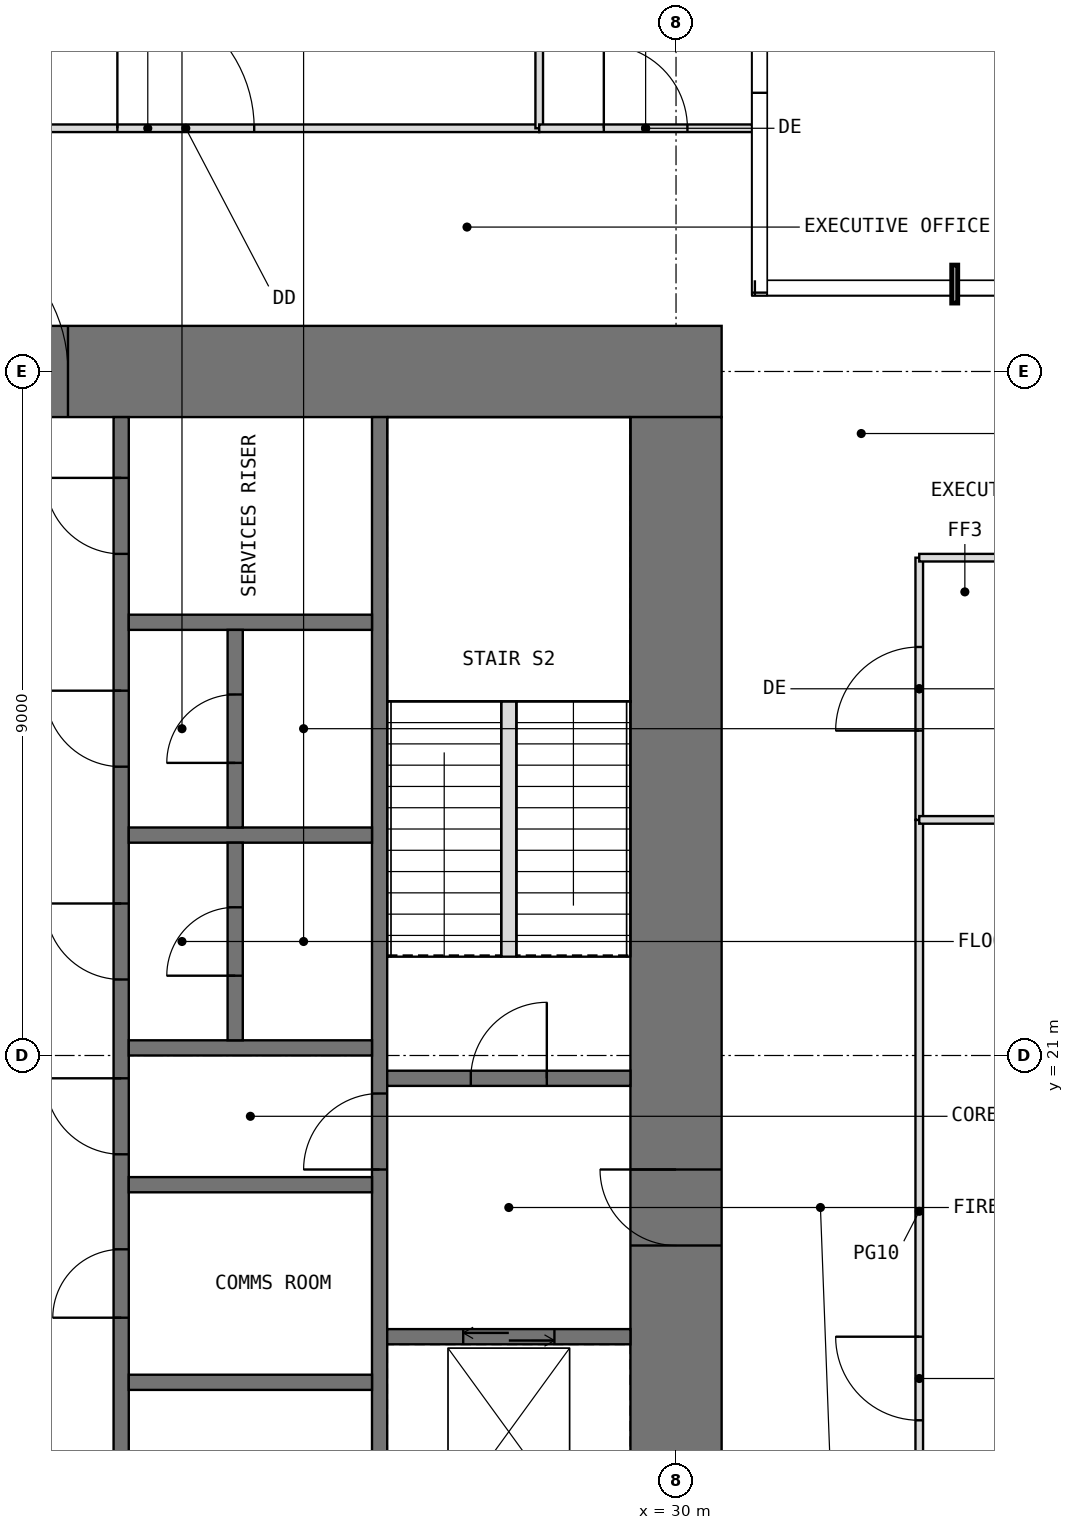
"""IFC4 building model, lengths in metres.
Left out: names, types, materials, properties, quantities, classifications, styles, units other than length and angle.
Written with IfcOpenShell. Run it as: python <this file> out.ifc"""

import sys

from ifc_helpers import new_model, si_unit, direction, frame, frame_2d, origin, place, context, subcontext, project, spatial, rectangle, extrude, element, fill, save


model = new_model("IFC4")
c1 = context("Model", 3, precision=1e-05, world=origin(), true_north=direction((0.0, 1.0)))
c2 = subcontext(c1, "Body", "Model", "MODEL_VIEW")
j1 = project(units=[si_unit("LENGTHUNIT", "METRE"), si_unit("PLANEANGLEUNIT", "RADIAN")], contexts=[c1])
p1 = place(None, origin())
s1 = spatial("IfcSite", under=j1, at=p1, CompositionType="ELEMENT")
p2 = place(p1, origin())
s2 = spatial("IfcBuilding", under=s1, at=p2, CompositionType="ELEMENT")
p3 = place(p2, frame((0.0, 0.0, 252.4)))
s3 = spatial("IfcBuildingStorey", under=s2, at=p3, CompositionType="ELEMENT", Elevation=252.4)
p4 = place(p3, frame((11.4, 30.0, -0.05), z_axis=(0.0, 0.0, 1.0), x_axis=(1.0, 0.0, 0.0)))
e1 = element("IfcWall", 1, at=p4, inside=s3, PredefinedType="SHEAR", context=c2, shape_type="SweptSolid", body=[
    extrude(rectangle(XDim=19.2, YDim=1.2, at=frame_2d((9.6, 0.0))), origin(), (0.0, 0.0, 1.0), 4.2),
])
p5 = place(p4, frame((8.6, 0.0, 0.05)))
e2 = element("IfcOpeningElement", 2, at=p5, cuts=e1, PredefinedType="OPENING", context=c2, shape_type="SweptSolid", body=[
    extrude(rectangle(XDim=2.0, YDim=2.2, at=frame_2d((1.0, 1.1))), frame((0.0, 0.61, 0.0), z_axis=(0.0, -1.0, 0.0), x_axis=(1.0, 0.0, 0.0)), (0.0, 0.0, 1.0), 1.22),
])
p6 = place(p3, frame((30.0, 12.6, -0.05), z_axis=(0.0, 0.0, 1.0), x_axis=(0.0, 1.0, 0.0)))
e3 = element("IfcWall", 3, at=p6, inside=s3, PredefinedType="SHEAR", context=c2, shape_type="SweptSolid", body=[
    extrude(rectangle(XDim=16.8, YDim=1.2, at=frame_2d((8.4, 0.0))), origin(), (0.0, 0.0, 1.0), 4.2),
])
p7 = place(p6, frame((5.9, 0.0, 0.05)))
e4 = element("IfcOpeningElement", 4, at=p7, cuts=e3, PredefinedType="OPENING", context=c2, shape_type="SweptSolid", body=[
    extrude(rectangle(XDim=1.0, YDim=2.2, at=frame_2d((0.5, 1.1))), frame((0.0, 0.61, 0.0), z_axis=(0.0, -1.0, 0.0), x_axis=(1.0, 0.0, 0.0)), (0.0, 0.0, 1.0), 1.22),
])
p8 = place(p3, frame((22.7, 12.6, -0.05), z_axis=(0.0, 0.0, 1.0), x_axis=(0.0, 1.0, 0.0)))
e5 = element("IfcWall", 5, at=p8, inside=s3, PredefinedType="SHEAR", context=c2, shape_type="SweptSolid", body=[
    extrude(rectangle(XDim=16.8, YDim=0.2, at=frame_2d((8.4, 0.0))), origin(), (0.0, 0.0, 1.0), 4.2),
])
p9 = place(p8, frame((7.1, 0.0, 0.05)))
e6 = element("IfcOpeningElement", 6, at=p9, cuts=e5, PredefinedType="OPENING", context=c2, shape_type="SweptSolid", body=[
    extrude(rectangle(XDim=1.0, YDim=2.2, at=frame_2d((0.5, 1.1))), frame((0.0, 0.11, 0.0), z_axis=(0.0, -1.0, 0.0), x_axis=(1.0, 0.0, 0.0)), (0.0, 0.0, 1.0), 0.22),
])
p10 = place(p8, frame((1.55, 0.0, 0.05)))
e7 = element("IfcOpeningElement", 7, at=p10, cuts=e5, PredefinedType="OPENING", context=c2, shape_type="SweptSolid", body=[
    extrude(rectangle(XDim=0.9, YDim=2.2, at=frame_2d((0.45, 1.1))), frame((0.0, 0.11, 0.0), z_axis=(0.0, -1.0, 0.0), x_axis=(1.0, 0.0, 0.0)), (0.0, 0.0, 1.0), 0.22),
])
p11 = place(p8, frame((4.95, 0.0, 0.05)))
e8 = element("IfcOpeningElement", 8, at=p11, cuts=e5, PredefinedType="OPENING", context=c2, shape_type="SweptSolid", body=[
    extrude(rectangle(XDim=0.9, YDim=2.2, at=frame_2d((0.45, 1.1))), frame((0.0, 0.11, 0.0), z_axis=(0.0, -1.0, 0.0), x_axis=(1.0, 0.0, 0.0)), (0.0, 0.0, 1.0), 0.22),
])
p12 = place(p8, frame((9.4, 0.0, 0.05)))
e9 = element("IfcOpeningElement", 9, at=p12, cuts=e5, PredefinedType="OPENING", context=c2, shape_type="SweptSolid", body=[
    extrude(rectangle(XDim=1.0, YDim=2.2, at=frame_2d((0.5, 1.1))), frame((0.0, 0.11, 0.0), z_axis=(0.0, -1.0, 0.0), x_axis=(1.0, 0.0, 0.0)), (0.0, 0.0, 1.0), 0.22),
])
p13 = place(p8, frame((12.2, 0.0, 0.05)))
e10 = element("IfcOpeningElement", 10, at=p13, cuts=e5, PredefinedType="OPENING", context=c2, shape_type="SweptSolid", body=[
    extrude(rectangle(XDim=1.0, YDim=2.2, at=frame_2d((0.5, 1.1))), frame((0.0, 0.11, 0.0), z_axis=(0.0, -1.0, 0.0), x_axis=(1.0, 0.0, 0.0)), (0.0, 0.0, 1.0), 0.22),
])
p14 = place(p8, frame((15.0, 0.0, 0.05)))
e11 = element("IfcOpeningElement", 11, at=p14, cuts=e5, PredefinedType="OPENING", context=c2, shape_type="SweptSolid", body=[
    extrude(rectangle(XDim=1.0, YDim=2.2, at=frame_2d((0.5, 1.1))), frame((0.0, 0.11, 0.0), z_axis=(0.0, -1.0, 0.0), x_axis=(1.0, 0.0, 0.0)), (0.0, 0.0, 1.0), 0.22),
])
p15 = place(p3, frame((26.1, 12.6, -0.05), z_axis=(0.0, 0.0, 1.0), x_axis=(0.0, 1.0, 0.0)))
e12 = element("IfcWall", 12, at=p15, inside=s3, PredefinedType="SHEAR", context=c2, shape_type="SweptSolid", body=[
    extrude(rectangle(XDim=16.8, YDim=0.2, at=frame_2d((8.4, 0.0))), origin(), (0.0, 0.0, 1.0), 4.2),
])
p16 = place(p15, frame((6.9, 0.0, 0.05)))
e13 = element("IfcOpeningElement", 13, at=p16, cuts=e12, PredefinedType="OPENING", context=c2, shape_type="SweptSolid", body=[
    extrude(rectangle(XDim=1.0, YDim=2.2, at=frame_2d((0.5, 1.1))), frame((0.0, 0.11, 0.0), z_axis=(0.0, -1.0, 0.0), x_axis=(1.0, 0.0, 0.0)), (0.0, 0.0, 1.0), 0.22),
])
for number, where, z_axis, x_axis in (
    (14, (22.8, 16.7, -0.05), (0.0, 0.0, 1.0), (1.0, 0.0, 0.0)),
    (15, (22.8, 19.3, -0.05), (0.0, 0.0, 1.0), (1.0, 0.0, 0.0)),
    (16, (22.8, 21.1, -0.05), (0.0, 0.0, 1.0), (1.0, 0.0, 0.0)),
    (17, (22.8, 23.9, -0.05), (0.0, 0.0, 1.0), (1.0, 0.0, 0.0)),
    (18, (22.8, 26.7, -0.05), (0.0, 0.0, 1.0), (1.0, 0.0, 0.0)),
):
    element("IfcWall", number, at=place(p3, frame(where, z_axis=z_axis, x_axis=x_axis)), inside=s3, PredefinedType="SHEAR", context=c2, shape_type="SweptSolid", body=[
        extrude(rectangle(XDim=3.2, YDim=0.2, at=frame_2d((1.6, 0.0))), origin(), (0.0, 0.0, 1.0), 4.2),
    ])
p17 = place(p3, frame((26.2, 17.3, -0.05), z_axis=(0.0, 0.0, 1.0), x_axis=(1.0, 0.0, 0.0)))
e19 = element("IfcWall", 19, at=p17, inside=s3, PredefinedType="SHEAR", context=c2, shape_type="SweptSolid", body=[
    extrude(rectangle(XDim=3.2, YDim=0.2, at=frame_2d((1.6, 0.0))), origin(), (0.0, 0.0, 1.0), 4.2),
])
p18 = place(p17, frame((1.0, 0.0, 0.05)))
e20 = element("IfcOpeningElement", 20, at=p18, cuts=e19, PredefinedType="OPENING", context=c2, shape_type="SweptSolid", body=[
    extrude(rectangle(XDim=1.2, YDim=2.2, at=frame_2d((0.6, 1.1))), frame((0.0, 0.11, 0.0), z_axis=(0.0, -1.0, 0.0), x_axis=(1.0, 0.0, 0.0)), (0.0, 0.0, 1.0), 0.22),
])
p19 = place(p3, frame((26.2, 20.7, -0.05), z_axis=(0.0, 0.0, 1.0), x_axis=(1.0, 0.0, 0.0)))
e21 = element("IfcWall", 21, at=p19, inside=s3, PredefinedType="SHEAR", context=c2, shape_type="SweptSolid", body=[
    extrude(rectangle(XDim=3.2, YDim=0.2, at=frame_2d((1.6, 0.0))), origin(), (0.0, 0.0, 1.0), 4.2),
])
p20 = place(p19, frame((1.1, 0.0, 0.05)))
e22 = element("IfcOpeningElement", 22, at=p20, cuts=e21, PredefinedType="OPENING", context=c2, shape_type="SweptSolid", body=[
    extrude(rectangle(XDim=1.0, YDim=2.2, at=frame_2d((0.5, 1.1))), frame((0.0, 0.11, 0.0), z_axis=(0.0, -1.0, 0.0), x_axis=(1.0, 0.0, 0.0)), (0.0, 0.0, 1.0), 0.22),
])
p21 = place(p3, frame((24.2, 21.2, -0.05), z_axis=(0.0, 0.0, 1.0), x_axis=(0.0, 1.0, 0.0)))
e23 = element("IfcWall", 23, at=p21, inside=s3, PredefinedType="SHEAR", context=c2, shape_type="SweptSolid", body=[
    extrude(rectangle(XDim=2.6, YDim=0.2, at=frame_2d((1.3, 0.0))), origin(), (0.0, 0.0, 1.0), 4.2),
])
p22 = place(p21, frame((0.85, 0.0, 0.05)))
e24 = element("IfcOpeningElement", 24, at=p22, cuts=e23, PredefinedType="OPENING", context=c2, shape_type="SweptSolid", body=[
    extrude(rectangle(XDim=0.9, YDim=2.2, at=frame_2d((0.45, 1.1))), frame((0.0, 0.11, 0.0), z_axis=(0.0, -1.0, 0.0), x_axis=(1.0, 0.0, 0.0)), (0.0, 0.0, 1.0), 0.22),
])
p23 = place(p3, frame((24.2, 24.0, -0.05), z_axis=(0.0, 0.0, 1.0), x_axis=(0.0, 1.0, 0.0)))
e25 = element("IfcWall", 25, at=p23, inside=s3, PredefinedType="SHEAR", context=c2, shape_type="SweptSolid", body=[
    extrude(rectangle(XDim=2.6, YDim=0.2, at=frame_2d((1.3, 0.0))), origin(), (0.0, 0.0, 1.0), 4.2),
])
p24 = place(p23, frame((0.85, 0.0, 0.05)))
e26 = element("IfcOpeningElement", 26, at=p24, cuts=e25, PredefinedType="OPENING", context=c2, shape_type="SweptSolid", body=[
    extrude(rectangle(XDim=0.9, YDim=2.2, at=frame_2d((0.45, 1.1))), frame((0.0, 0.11, 0.0), z_axis=(0.0, -1.0, 0.0), x_axis=(1.0, 0.0, 0.0)), (0.0, 0.0, 1.0), 0.22),
])
p25 = place(p3, frame((17.9, 33.2, 0.0), z_axis=(0.0, 0.0, 1.0), x_axis=(1.0, 0.0, 0.0)))
e27 = element("IfcWall", 27, at=p25, inside=s3, PredefinedType="PARTITIONING", context=c2, shape_type="SweptSolid", body=[
    extrude(rectangle(XDim=10.3, YDim=0.1, at=frame_2d((5.15, 0.0))), origin(), (0.0, 0.0, 1.0), 3.95),
])
p26 = place(p25, frame((4.75, 0.0, 0.0)))
e28 = element("IfcOpeningElement", 28, at=p26, cuts=e27, PredefinedType="OPENING", context=c2, shape_type="SweptSolid", body=[
    extrude(rectangle(XDim=1.8, YDim=2.4, at=frame_2d((0.9, 1.2))), frame((0.0, 0.06, 0.0), z_axis=(0.0, -1.0, 0.0), x_axis=(1.0, 0.0, 0.0)), (0.0, 0.0, 1.0), 0.12),
])
p27 = place(p3, frame((28.2, 33.2, 0.0), z_axis=(0.0, 0.0, 1.0), x_axis=(0.0, 1.0, 0.0)))
e29 = element("IfcWall", 29, at=p27, inside=s3, PredefinedType="PARTITIONING", context=c2, shape_type="SweptSolid", body=[
    extrude(rectangle(XDim=5.8, YDim=0.1, at=frame_2d((2.9, 0.0))), origin(), (0.0, 0.0, 1.0), 3.95),
])
p28 = place(p3, frame((28.2, 33.2, 0.0), z_axis=(0.0, 0.0, 1.0), x_axis=(1.0, 0.0, 0.0)))
e30 = element("IfcWall", 30, at=p28, inside=s3, PredefinedType="PARTITIONING", context=c2, shape_type="SweptSolid", body=[
    extrude(rectangle(XDim=2.8, YDim=0.1, at=frame_2d((1.4, 0.0))), origin(), (0.0, 0.0, 1.0), 3.95),
])
p29 = place(p28, frame((0.85, 0.0, 0.0)))
e31 = element("IfcOpeningElement", 31, at=p29, cuts=e30, PredefinedType="OPENING", context=c2, shape_type="SweptSolid", body=[
    extrude(rectangle(XDim=1.1, YDim=2.3, at=frame_2d((0.55, 1.15))), frame((0.0, 0.06, 0.0), z_axis=(0.0, -1.0, 0.0), x_axis=(1.0, 0.0, 0.0)), (0.0, 0.0, 1.0), 0.12),
])
p30 = place(p3, frame((33.2, 13.8, 0.0), z_axis=(0.0, 0.0, 1.0), x_axis=(0.0, 1.0, 0.0)))
e32 = element("IfcWall", 32, at=p30, inside=s3, PredefinedType="PARTITIONING", context=c2, shape_type="SweptSolid", body=[
    extrude(rectangle(XDim=10.3, YDim=0.1, at=frame_2d((5.15, 0.0))), origin(), (0.0, 0.0, 1.0), 3.95),
])
p31 = place(p30, frame((2.4, 0.0, 0.0)))
e33 = element("IfcOpeningElement", 33, at=p31, cuts=e32, PredefinedType="OPENING", context=c2, shape_type="SweptSolid", body=[
    extrude(rectangle(XDim=1.1, YDim=2.3, at=frame_2d((0.55, 1.15))), frame((0.0, 0.06, 0.0), z_axis=(0.0, -1.0, 0.0), x_axis=(1.0, 0.0, 0.0)), (0.0, 0.0, 1.0), 0.12),
])
p32 = place(p3, frame((33.2, 24.1, 0.0), z_axis=(0.0, 0.0, 1.0), x_axis=(0.0, 1.0, 0.0)))
e34 = element("IfcWall", 34, at=p32, inside=s3, PredefinedType="PARTITIONING", context=c2, shape_type="SweptSolid", body=[
    extrude(rectangle(XDim=3.45, YDim=0.1, at=frame_2d((1.725, 0.0))), origin(), (0.0, 0.0, 1.0), 3.95),
])
p33 = place(p32, frame((1.175, 0.0, 0.0)))
e35 = element("IfcOpeningElement", 35, at=p33, cuts=e34, PredefinedType="OPENING", context=c2, shape_type="SweptSolid", body=[
    extrude(rectangle(XDim=1.1, YDim=2.3, at=frame_2d((0.55, 1.15))), frame((0.0, 0.06, 0.0), z_axis=(0.0, -1.0, 0.0), x_axis=(1.0, 0.0, 0.0)), (0.0, 0.0, 1.0), 0.12),
])
for number, where, z_axis, x_axis in (
    (36, (33.2, 24.1, 0.0), (0.0, 0.0, 1.0), (1.0, 0.0, 0.0)),
    (37, (33.2, 27.55, 0.0), (0.0, 0.0, 1.0), (1.0, 0.0, 0.0)),
):
    element("IfcWall", number, at=place(p3, frame(where, z_axis=z_axis, x_axis=x_axis)), inside=s3, PredefinedType="PARTITIONING", context=c2, shape_type="SweptSolid", body=[
        extrude(rectangle(XDim=5.8, YDim=0.1, at=frame_2d((2.9, 0.0))), origin(), (0.0, 0.0, 1.0), 3.95),
    ])
p34 = place(p3, frame((27.8, 22.3, 0.0), z_axis=(0.0, 0.0, 1.0), x_axis=(0.0, 1.0, 0.0)))
e38 = element("IfcWall", 38, at=p34, inside=s3, PredefinedType="PARTITIONING", context=c2, shape_type="SweptSolid", body=[
    extrude(rectangle(XDim=3.36, YDim=0.2, at=frame_2d((1.68, 0.0))), origin(), (0.0, 0.0, 1.0), 4.2),
])
p35 = place(p5, origin())
e39 = element("IfcDoor", 39, at=p35, inside=s3, OperationType="DOUBLE_DOOR_SINGLE_SWING", PredefinedType="DOOR", context=c2, shape_type="SweptSolid", body=[
    extrude(rectangle(XDim=2.0, YDim=2.2, at=frame_2d((1.0, 1.1))), frame((0.0, 0.025, 0.0), z_axis=(0.0, -1.0, 0.0), x_axis=(1.0, 0.0, 0.0)), (0.0, 0.0, 1.0), 0.05),
])
fill(e2, e39)
p36 = place(p7, origin())
e40 = element("IfcDoor", 40, at=p36, inside=s3, OperationType="SINGLE_SWING_RIGHT", PredefinedType="DOOR", context=c2, shape_type="SweptSolid", body=[
    extrude(rectangle(XDim=1.0, YDim=2.2, at=frame_2d((0.5, 1.1))), frame((0.0, 0.025, 0.0), z_axis=(0.0, -1.0, 0.0), x_axis=(1.0, 0.0, 0.0)), (0.0, 0.0, 1.0), 0.05),
])
fill(e4, e40)
p37 = place(p20, origin())
e41 = element("IfcDoor", 41, at=p37, inside=s3, OperationType="SINGLE_SWING_RIGHT", PredefinedType="DOOR", context=c2, shape_type="SweptSolid", body=[
    extrude(rectangle(XDim=1.0, YDim=2.2, at=frame_2d((0.5, 1.1))), frame((0.0, 0.025, 0.0), z_axis=(0.0, -1.0, 0.0), x_axis=(1.0, 0.0, 0.0)), (0.0, 0.0, 1.0), 0.05),
])
fill(e22, e41)
p38 = place(p16, origin())
e42 = element("IfcDoor", 42, at=p38, inside=s3, OperationType="SINGLE_SWING_LEFT", PredefinedType="DOOR", context=c2, shape_type="SweptSolid", body=[
    extrude(rectangle(XDim=1.0, YDim=2.2, at=frame_2d((0.5, 1.1))), frame((0.0, 0.025, 0.0), z_axis=(0.0, -1.0, 0.0), x_axis=(1.0, 0.0, 0.0)), (0.0, 0.0, 1.0), 0.05),
])
fill(e13, e42)
p39 = place(p9, origin())
e43 = element("IfcDoor", 43, at=p39, inside=s3, OperationType="SINGLE_SWING_RIGHT", PredefinedType="DOOR", context=c2, shape_type="SweptSolid", body=[
    extrude(rectangle(XDim=1.0, YDim=2.2, at=frame_2d((0.5, 1.1))), frame((0.0, 0.025, 0.0), z_axis=(0.0, -1.0, 0.0), x_axis=(1.0, 0.0, 0.0)), (0.0, 0.0, 1.0), 0.05),
])
fill(e6, e43)
p40 = place(p11, origin())
e44 = element("IfcDoor", 44, at=p40, inside=s3, OperationType="SINGLE_SWING_LEFT", PredefinedType="DOOR", context=c2, shape_type="SweptSolid", body=[
    extrude(rectangle(XDim=0.9, YDim=2.2, at=frame_2d((0.45, 1.1))), frame((0.0, 0.025, 0.0), z_axis=(0.0, -1.0, 0.0), x_axis=(1.0, 0.0, 0.0)), (0.0, 0.0, 1.0), 0.05),
])
fill(e8, e44)
p41 = place(p12, origin())
e45 = element("IfcDoor", 45, at=p41, inside=s3, OperationType="SINGLE_SWING_RIGHT", PredefinedType="DOOR", context=c2, shape_type="SweptSolid", body=[
    extrude(rectangle(XDim=1.0, YDim=2.2, at=frame_2d((0.5, 1.1))), frame((0.0, 0.025, 0.0), z_axis=(0.0, -1.0, 0.0), x_axis=(1.0, 0.0, 0.0)), (0.0, 0.0, 1.0), 0.05),
])
fill(e9, e45)
p42 = place(p22, origin())
e46 = element("IfcDoor", 46, at=p42, inside=s3, OperationType="SINGLE_SWING_LEFT", PredefinedType="DOOR", context=c2, shape_type="SweptSolid", body=[
    extrude(rectangle(XDim=0.9, YDim=2.2, at=frame_2d((0.45, 1.1))), frame((0.0, 0.025, 0.0), z_axis=(0.0, -1.0, 0.0), x_axis=(1.0, 0.0, 0.0)), (0.0, 0.0, 1.0), 0.05),
])
fill(e24, e46)
p43 = place(p13, origin())
e47 = element("IfcDoor", 47, at=p43, inside=s3, OperationType="SINGLE_SWING_RIGHT", PredefinedType="DOOR", context=c2, shape_type="SweptSolid", body=[
    extrude(rectangle(XDim=1.0, YDim=2.2, at=frame_2d((0.5, 1.1))), frame((0.0, 0.025, 0.0), z_axis=(0.0, -1.0, 0.0), x_axis=(1.0, 0.0, 0.0)), (0.0, 0.0, 1.0), 0.05),
])
fill(e10, e47)
p44 = place(p24, origin())
e48 = element("IfcDoor", 48, at=p44, inside=s3, OperationType="SINGLE_SWING_LEFT", PredefinedType="DOOR", context=c2, shape_type="SweptSolid", body=[
    extrude(rectangle(XDim=0.9, YDim=2.2, at=frame_2d((0.45, 1.1))), frame((0.0, 0.025, 0.0), z_axis=(0.0, -1.0, 0.0), x_axis=(1.0, 0.0, 0.0)), (0.0, 0.0, 1.0), 0.05),
])
fill(e26, e48)
p45 = place(p14, origin())
e49 = element("IfcDoor", 49, at=p45, inside=s3, OperationType="SINGLE_SWING_RIGHT", PredefinedType="DOOR", context=c2, shape_type="SweptSolid", body=[
    extrude(rectangle(XDim=1.0, YDim=2.2, at=frame_2d((0.5, 1.1))), frame((0.0, 0.025, 0.0), z_axis=(0.0, -1.0, 0.0), x_axis=(1.0, 0.0, 0.0)), (0.0, 0.0, 1.0), 0.05),
])
fill(e11, e49)
p46 = place(p31, origin())
e50 = element("IfcDoor", 50, at=p46, inside=s3, OperationType="SINGLE_SWING_RIGHT", PredefinedType="DOOR", context=c2, shape_type="SweptSolid", body=[
    extrude(rectangle(XDim=1.1, YDim=2.3, at=frame_2d((0.55, 1.15))), frame((0.0, 0.025, 0.0), z_axis=(0.0, -1.0, 0.0), x_axis=(1.0, 0.0, 0.0)), (0.0, 0.0, 1.0), 0.05),
])
fill(e33, e50)
p47 = place(p33, origin())
e51 = element("IfcDoor", 51, at=p47, inside=s3, OperationType="SINGLE_SWING_LEFT", PredefinedType="DOOR", context=c2, shape_type="SweptSolid", body=[
    extrude(rectangle(XDim=1.1, YDim=2.3, at=frame_2d((0.55, 1.15))), frame((0.0, 0.025, 0.0), z_axis=(0.0, -1.0, 0.0), x_axis=(1.0, 0.0, 0.0)), (0.0, 0.0, 1.0), 0.05),
])
fill(e35, e51)
p48 = place(p26, origin())
e52 = element("IfcDoor", 52, at=p48, inside=s3, OperationType="DOUBLE_DOOR_SINGLE_SWING", PredefinedType="DOOR", context=c2, shape_type="SweptSolid", body=[
    extrude(rectangle(XDim=1.8, YDim=2.4, at=frame_2d((0.9, 1.2))), frame((0.0, 0.025, 0.0), z_axis=(0.0, -1.0, 0.0), x_axis=(1.0, 0.0, 0.0)), (0.0, 0.0, 1.0), 0.05),
])
fill(e28, e52)
p49 = place(p29, origin())
e53 = element("IfcDoor", 53, at=p49, inside=s3, OperationType="SINGLE_SWING_LEFT", PredefinedType="DOOR", context=c2, shape_type="SweptSolid", body=[
    extrude(rectangle(XDim=1.1, YDim=2.3, at=frame_2d((0.55, 1.15))), frame((0.0, 0.025, 0.0), z_axis=(0.0, -1.0, 0.0), x_axis=(1.0, 0.0, 0.0)), (0.0, 0.0, 1.0), 0.05),
])
fill(e31, e53)
p50 = place(p18, origin())
e54 = element("IfcDoor", 54, at=p50, inside=s3, OperationType="DOUBLE_DOOR_SLIDING", PredefinedType="DOOR", context=c2, shape_type="SweptSolid", body=[
    extrude(rectangle(XDim=1.2, YDim=2.2, at=frame_2d((0.6, 1.1))), frame((0.0, 0.025, 0.0), z_axis=(0.0, -1.0, 0.0), x_axis=(1.0, 0.0, 0.0)), (0.0, 0.0, 1.0), 0.05),
])
fill(e20, e54)
save(model, sys.argv[1])
